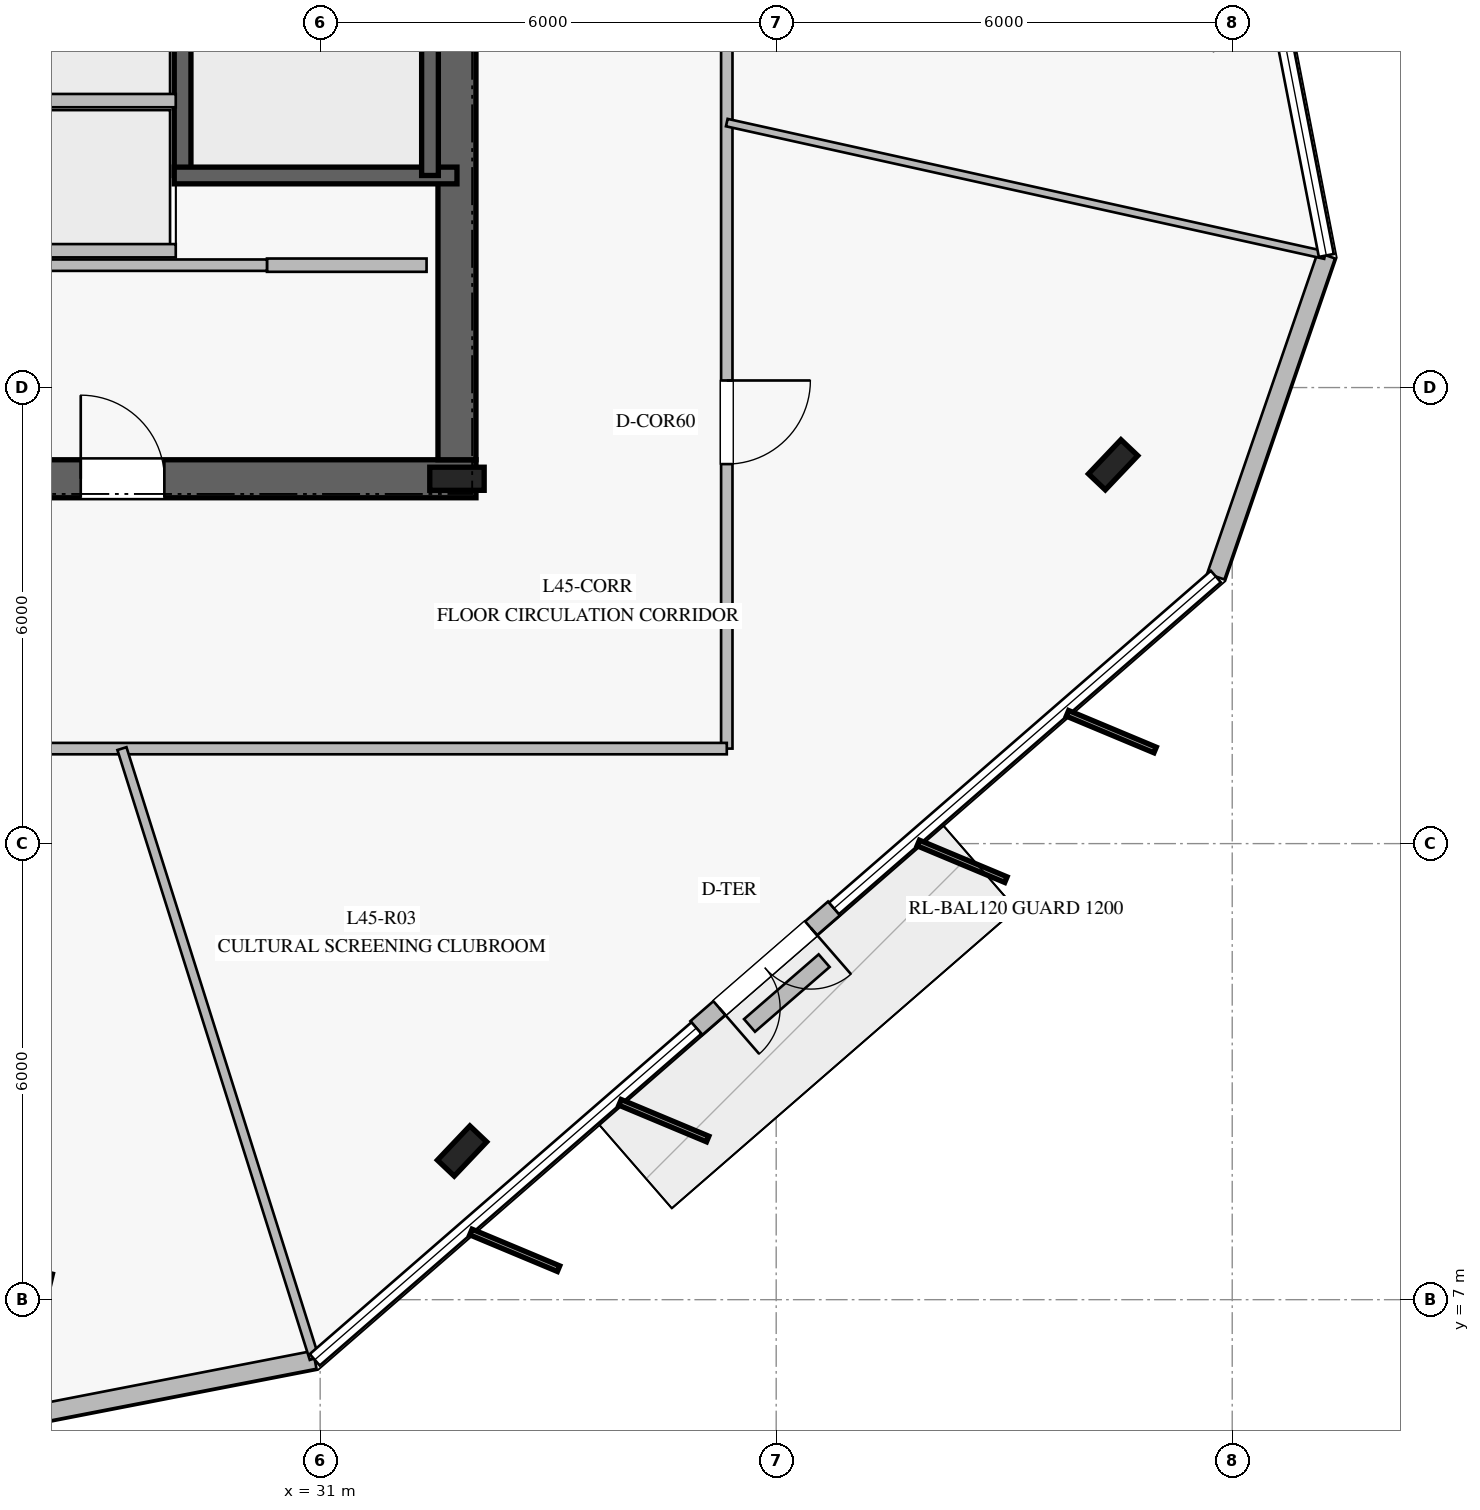
"""IFC4 building model, lengths in metres.
Left out: names, types, materials, properties, quantities, classifications, styles, units other than length and angle.
Written with IfcOpenShell. Run it as: python <this file> out.ifc"""

import sys

from ifc_helpers import new_model, si_unit, direction, frame, frame_2d, origin, origin_2d, place, context, subcontext, project, spatial, rectangle, i_section, extrude, element, fill, save


model = new_model("IFC4")
c1 = context("Model", 3, precision=1e-05, world=origin(), true_north=direction((0.0, 1.0)))
c2 = subcontext(c1, "Body", "Model", "MODEL_VIEW")
j1 = project(units=[si_unit("LENGTHUNIT", "METRE"), si_unit("PLANEANGLEUNIT", "RADIAN")], contexts=[c1])
p1 = place(None, origin())
s1 = spatial("IfcSite", under=j1, at=p1, CompositionType="ELEMENT")
p2 = place(p1, origin())
s2 = spatial("IfcBuilding", under=s1, at=p2, CompositionType="ELEMENT")
p3 = place(p2, frame((0.0, 0.0, 188.8)))
s3 = spatial("IfcBuildingStorey", under=s2, at=p3, CompositionType="ELEMENT", Elevation=188.8)
p4 = place(p3, frame((16.95, 17.8, 0.0), z_axis=(0.0, 0.0, 1.0), x_axis=(1.0, 0.0, 0.0)))
e1 = element("IfcWall", 1, at=p4, inside=s3, PredefinedType="SHEAR", context=c2, shape_type="SweptSolid", body=[
    extrude(rectangle(XDim=16.1, YDim=0.5, at=frame_2d((8.05, 0.0))), origin(), (0.0, 0.0, 1.0), 3.78),
])
p5 = place(p4, frame((5.0, 0.0, 0.0)))
e2 = element("IfcOpeningElement", 2, at=p5, cuts=e1, PredefinedType="OPENING", context=c2, shape_type="SweptSolid", body=[
    extrude(rectangle(XDim=1.2, YDim=2.25, at=frame_2d((0.6, 1.125))), frame((0.0, 0.26, 0.0), z_axis=(0.0, -1.0, 0.0), x_axis=(1.0, 0.0, 0.0)), (0.0, 0.0, 1.0), 0.52),
])
p6 = place(p4, frame((10.9, 0.0, 0.0)))
e3 = element("IfcOpeningElement", 3, at=p6, cuts=e1, PredefinedType="OPENING", context=c2, shape_type="SweptSolid", body=[
    extrude(rectangle(XDim=1.1, YDim=2.2, at=frame_2d((0.55, 1.1))), frame((0.0, 0.26, 0.0), z_axis=(0.0, -1.0, 0.0), x_axis=(1.0, 0.0, 0.0)), (0.0, 0.0, 1.0), 0.52),
])
p7 = place(p3, frame((32.8, 18.05, 0.0), z_axis=(0.0, 0.0, 1.0), x_axis=(0.0, 1.0, 0.0)))
e4 = element("IfcWall", 4, at=p7, inside=s3, PredefinedType="SHEAR", context=c2, shape_type="SweptSolid", body=[
    extrude(rectangle(XDim=13.9, YDim=0.5, at=frame_2d((6.95, 0.0))), origin(), (0.0, 0.0, 1.0), 3.78),
])
p8 = place(p3, frame((32.8, 17.8, 0.0), z_axis=(0.0, 0.0, 1.0), x_axis=(1.0, 0.0, 0.0)))
e5 = element("IfcColumn", 5, at=p8, inside=s3, PredefinedType="COLUMN", context=c2, shape_type="SweptSolid", body=[
    extrude(i_section(OverallWidth=0.304, OverallDepth=0.716, WebThickness=0.021, FlangeThickness=0.04, at=origin_2d()), origin(), (0.0, 0.0, 1.0), 4.0),
])
p9 = place(p3, frame((29.19, 21.79, 0.0), z_axis=(0.0, 0.0, 1.0), x_axis=(0.0, 1.0, 0.0)))
e6 = element("IfcWall", 6, at=p9, inside=s3, PredefinedType="SOLIDWALL", context=c2, shape_type="SweptSolid", body=[
    extrude(rectangle(XDim=7.22, YDim=0.22, at=frame_2d((3.61, 0.0))), origin(), (0.0, 0.0, 1.0), 3.78),
])
p10 = place(p9, frame((5.88, 0.0, 0.0)))
e7 = element("IfcOpeningElement", 7, at=p10, cuts=e6, PredefinedType="OPENING", context=c2, shape_type="SweptSolid", body=[
    extrude(rectangle(XDim=1.15, YDim=2.2, at=frame_2d((0.575, 1.1))), frame((0.0, 0.12, 0.0), z_axis=(0.0, -1.0, 0.0), x_axis=(1.0, 0.0, 0.0)), (0.0, 0.0, 1.0), 0.24),
])
p11 = place(p3, frame((29.08, 21.79, 0.0), z_axis=(0.0, 0.0, 1.0), x_axis=(1.0, 0.0, 0.0)))
e8 = element("IfcWall", 8, at=p11, inside=s3, PredefinedType="SOLIDWALL", context=c2, shape_type="SweptSolid", body=[
    extrude(rectangle(XDim=3.72, YDim=0.22, at=frame_2d((1.86, 0.0))), origin(), (0.0, 0.0, 1.0), 3.78),
])
p12 = place(p3, frame((32.445, 29.01, 0.0), z_axis=(0.0, 0.0, 1.0), x_axis=(0.0, -1.0, 0.0)))
e9 = element("IfcWall", 9, at=p12, inside=s3, PredefinedType="SOLIDWALL", context=c2, shape_type="SweptSolid", body=[
    extrude(rectangle(XDim=7.22, YDim=0.22, at=frame_2d((3.61, 0.0))), origin(), (0.0, 0.0, 1.0), 3.78),
])
for number, where, z_axis, x_axis in (
    (10, (32.867, 8.956, 0.0), (0.0, 0.0, 1.0), (0.688, 0.725, 0.0)),
    (11, (41.433, 17.984, 0.0), (0.0, 0.0, 1.0), (0.688, 0.725, 0.0)),
):
    element("IfcColumn", number, at=place(p3, frame(where, z_axis=z_axis, x_axis=x_axis)), inside=s3, PredefinedType="COLUMN", context=c2, shape_type="SweptSolid", body=[
        extrude(i_section(OverallWidth=0.305, OverallDepth=0.62, WebThickness=0.021, FlangeThickness=0.04, at=origin_2d()), origin(), (0.0, 0.0, 1.0), 4.0),
    ])
p13 = place(p3, frame((26.542, 5.356, 0.0), z_axis=(0.0, 0.0, 1.0), x_axis=(0.981615105357, 0.190871121271, 0.0)))
e12 = element("IfcWall", 12, at=p13, inside=s3, PredefinedType="STANDARD", context=c2, shape_type="SweptSolid", body=[
    extrude(rectangle(XDim=4.469, YDim=0.24, at=frame_2d((2.235, 0.0))), origin(), (0.0, 0.0, 1.0), 3.78),
])
p14 = place(p3, frame((35.95, 10.574, 0.0), z_axis=(0.0, 0.0, 1.0), x_axis=(0.754778546913, 0.655979683466, 0.0)))
e13 = element("IfcWall", 13, at=p14, inside=s3, PredefinedType="STANDARD", context=c2, shape_type="SweptSolid", body=[
    extrude(rectangle(XDim=2.399, YDim=0.24, at=frame_2d((1.2, 0.0))), origin(), (0.0, 0.0, 1.0), 3.78),
])
p15 = place(p14, frame((0.4, 0.0, 0.0)))
e14 = element("IfcOpeningElement", 14, at=p15, cuts=e13, PredefinedType="OPENING", context=c2, shape_type="SweptSolid", body=[
    extrude(rectangle(XDim=1.6, YDim=2.25, at=frame_2d((0.8, 1.125))), frame((0.0, 0.13, 0.0), z_axis=(0.0, -1.0, 0.0), x_axis=(1.0, 0.0, 0.0)), (0.0, 0.0, 1.0), 0.26),
])
p16 = place(p3, frame((42.784, 16.514, 0.0), z_axis=(0.0, 0.0, 1.0), x_axis=(0.325492114227, 0.94554475493, 0.0)))
e15 = element("IfcWall", 15, at=p16, inside=s3, PredefinedType="STANDARD", context=c2, shape_type="SweptSolid", body=[
    extrude(rectangle(XDim=4.467, YDim=0.24, at=frame_2d((2.234, 0.0))), origin(), (0.0, 0.0, 1.0), 3.78),
])
p17 = place(p3, frame((36.649, 10.608, 0.0), z_axis=(0.0, 0.0, 1.0), x_axis=(0.75537303729, 0.655295028621, 0.0)))
e16 = element("IfcWall", 16, at=p17, inside=s3, PredefinedType="USERDEFINED", context=c2, shape_type="SweptSolid", body=[
    extrude(rectangle(XDim=1.3, YDim=0.22, at=frame_2d((0.65, 0.0))), origin(), (0.0, 0.0, 1.0), 0.4),
])
p18 = place(p3, frame((30.3, 20.61, 0.0), z_axis=(0.0, 0.0, 1.0), x_axis=(1.0, 0.0, 0.0)))
e17 = element("IfcWall", 17, at=p18, inside=s3, PredefinedType="PARTITIONING", context=c2, shape_type="SweptSolid", body=[
    extrude(rectangle(XDim=2.1, YDim=0.175, at=frame_2d((1.05, 0.0))), origin(), (0.0, 0.0, 1.0), 3.78),
])
p19 = place(p3, frame((24.4, 20.61, 0.0), z_axis=(0.0, 0.0, 1.0), x_axis=(1.0, 0.0, 0.0)))
e18 = element("IfcWall", 18, at=p19, inside=s3, PredefinedType="PARTITIONING", context=c2, shape_type="SweptSolid", body=[
    extrude(rectangle(XDim=5.9, YDim=0.15, at=frame_2d((2.95, 0.0))), origin(), (0.0, 0.0, 1.0), 3.78),
])
for number, where, z_axis, x_axis in (
    (19, (26.75, 20.8, 0.0), (0.0, 0.0, 1.0), (1.0, 0.0, 0.0)),
    (20, (26.75, 22.775, 0.0), (0.0, 0.0, 1.0), (1.0, 0.0, 0.0)),
):
    element("IfcWall", number, at=place(p3, frame(where, z_axis=z_axis, x_axis=x_axis)), inside=s3, PredefinedType="PARTITIONING", context=c2, shape_type="SweptSolid", body=[
        extrude(rectangle(XDim=2.35, YDim=0.175, at=frame_2d((1.175, 0.0))), origin(), (0.0, 0.0, 1.0), 3.78),
    ])
p20 = place(p3, frame((36.35, 35.75, 0.0), z_axis=(0.0, 0.0, 1.0), x_axis=(0.0, -1.0, 0.0)))
e21 = element("IfcWall", 21, at=p20, inside=s3, PredefinedType="PARTITIONING", context=c2, shape_type="SweptSolid", body=[
    extrude(rectangle(XDim=21.5, YDim=0.15, at=frame_2d((10.75, 0.0))), origin(), (0.0, 0.0, 1.0), 3.02),
])
p21 = place(p20, frame((16.657, 0.0, 0.0)))
e22 = element("IfcOpeningElement", 22, at=p21, cuts=e21, PredefinedType="OPENING", context=c2, shape_type="SweptSolid", body=[
    extrude(rectangle(XDim=1.1, YDim=2.2, at=frame_2d((0.55, 1.1))), frame((0.0, 0.085, 0.0), z_axis=(0.0, -1.0, 0.0), x_axis=(1.0, 0.0, 0.0)), (0.0, 0.0, 1.0), 0.17),
])
p22 = place(p20, frame((7.538, 0.0, 0.0)))
e23 = element("IfcOpeningElement", 23, at=p22, cuts=e21, PredefinedType="OPENING", context=c2, shape_type="SweptSolid", body=[
    extrude(rectangle(XDim=1.1, YDim=2.2, at=frame_2d((0.55, 1.1))), frame((0.0, 0.085, 0.0), z_axis=(0.0, -1.0, 0.0), x_axis=(1.0, 0.0, 0.0)), (0.0, 0.0, 1.0), 0.17),
])
p23 = place(p3, frame((36.35, 14.25, 0.0), z_axis=(0.0, 0.0, 1.0), x_axis=(-1.0, 0.0, 0.0)))
e24 = element("IfcWall", 24, at=p23, inside=s3, PredefinedType="PARTITIONING", context=c2, shape_type="SweptSolid", body=[
    extrude(rectangle(XDim=22.7, YDim=0.15, at=frame_2d((11.35, 0.0))), origin(), (0.0, 0.0, 1.0), 3.02),
])
p24 = place(p23, frame((13.972, 0.0, 0.0)))
e25 = element("IfcOpeningElement", 25, at=p24, cuts=e24, PredefinedType="OPENING", context=c2, shape_type="SweptSolid", body=[
    extrude(rectangle(XDim=1.1, YDim=2.2, at=frame_2d((0.55, 1.1))), frame((0.0, 0.085, 0.0), z_axis=(0.0, -1.0, 0.0), x_axis=(1.0, 0.0, 0.0)), (0.0, 0.0, 1.0), 0.17),
])
p25 = place(p3, frame((28.392, 14.25, 0.0), z_axis=(0.0, 0.0, 1.0), x_axis=(0.300821664348, -0.953680410965, 0.0)))
e26 = element("IfcWall", 26, at=p25, inside=s3, PredefinedType="PARTITIONING", context=c2, shape_type="SweptSolid", body=[
    extrude(rectangle(XDim=8.414, YDim=0.125, at=frame_2d((4.207, 0.0))), origin(), (0.0, 0.0, 1.0), 3.05),
])
p26 = place(p3, frame((36.35, 22.486, 0.0), z_axis=(0.0, 0.0, 1.0), x_axis=(0.976316571285, -0.216346834122, 0.0)))
e27 = element("IfcWall", 27, at=p26, inside=s3, PredefinedType="MOVABLE", context=c2, shape_type="SweptSolid", body=[
    extrude(rectangle(XDim=8.062, YDim=0.1, at=frame_2d((4.031, 0.0))), origin(), (0.0, 0.0, 1.0), 3.18),
])
p27 = place(p15, frame((1.6, 0.0, 0.0), z_axis=(0.0, 0.0, 1.0), x_axis=(-1.0, 0.0, 0.0)))
e28 = element("IfcDoor", 28, at=p27, inside=s3, OperationType="DOUBLE_DOOR_SINGLE_SWING", PredefinedType="DOOR", context=c2, shape_type="SweptSolid", body=[
    extrude(rectangle(XDim=1.6, YDim=2.25, at=frame_2d((0.8, 1.125))), frame((0.0, 0.025, 0.0), z_axis=(0.0, -1.0, 0.0), x_axis=(1.0, 0.0, 0.0)), (0.0, 0.0, 1.0), 0.05),
])
fill(e14, e28)
p28 = place(p6, origin())
e29 = element("IfcDoor", 29, at=p28, inside=s3, OperationType="SINGLE_SWING_LEFT", PredefinedType="DOOR", context=c2, shape_type="SweptSolid", body=[
    extrude(rectangle(XDim=1.1, YDim=2.2, at=frame_2d((0.55, 1.1))), frame((0.0, 0.025, 0.0), z_axis=(0.0, -1.0, 0.0), x_axis=(1.0, 0.0, 0.0)), (0.0, 0.0, 1.0), 0.05),
])
fill(e3, e29)
p29 = place(p21, origin())
e30 = element("IfcDoor", 30, at=p29, inside=s3, OperationType="SINGLE_SWING_LEFT", PredefinedType="DOOR", context=c2, shape_type="SweptSolid", body=[
    extrude(rectangle(XDim=1.1, YDim=2.2, at=frame_2d((0.55, 1.1))), frame((0.0, 0.025, 0.0), z_axis=(0.0, -1.0, 0.0), x_axis=(1.0, 0.0, 0.0)), (0.0, 0.0, 1.0), 0.05),
])
fill(e22, e30)
save(model, sys.argv[1])
